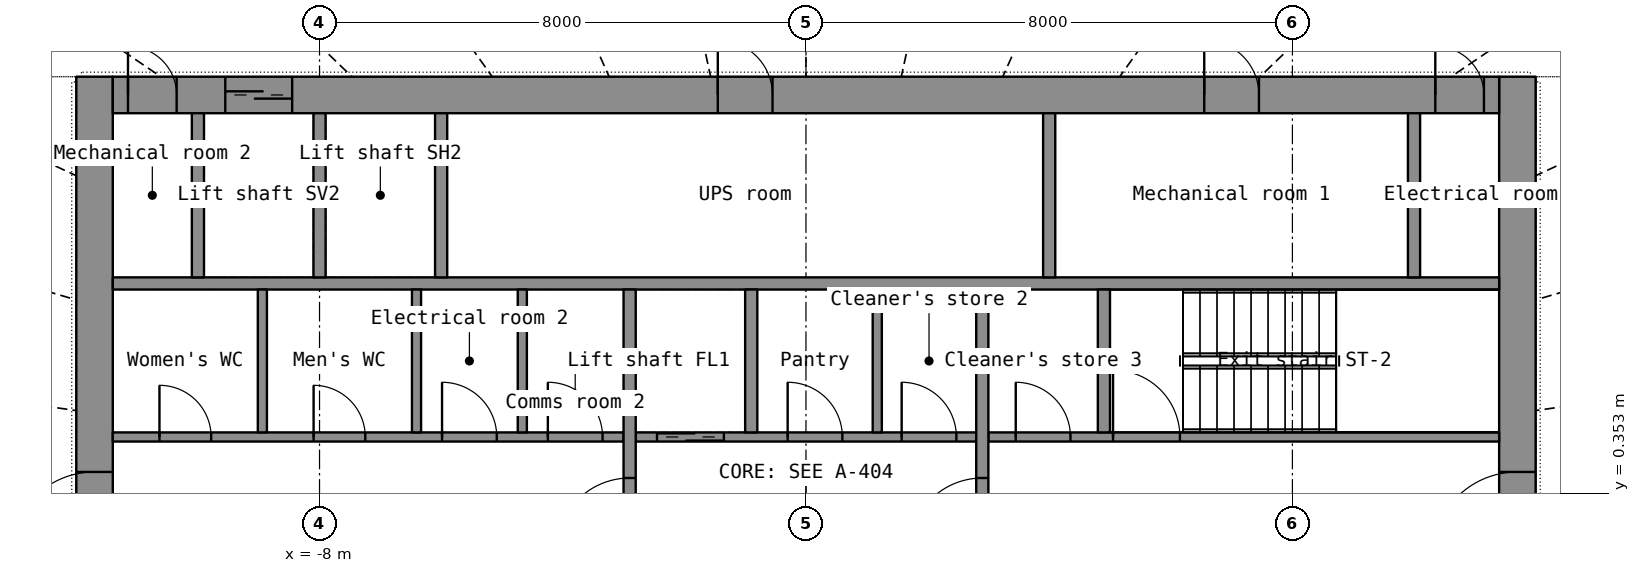
"""IFC4 building model, lengths in metres.
Left out: names, types, materials, properties, quantities, classifications, styles, units other than length and angle.
Written with IfcOpenShell. Run it as: python <this file> out.ifc"""

import sys

from ifc_helpers import new_model, si_unit, direction, frame, frame_2d, origin, place, context, subcontext, project, spatial, rectangle, extrude, element, fill, save


model = new_model("IFC4")
c1 = context("Model", 3, precision=1e-05, world=origin(), true_north=direction((0.0, 1.0)))
c2 = subcontext(c1, "Body", "Model", "MODEL_VIEW")
j1 = project(units=[si_unit("LENGTHUNIT", "METRE"), si_unit("PLANEANGLEUNIT", "RADIAN")], contexts=[c1])
p1 = place(None, origin())
s1 = spatial("IfcSite", under=j1, at=p1, CompositionType="ELEMENT")
p2 = place(p1, origin())
s2 = spatial("IfcBuilding", under=s1, at=p2, CompositionType="ELEMENT")
p3 = place(p2, frame((0.0, 0.0, 13.5)))
s3 = spatial("IfcBuildingStorey", under=s2, at=p3, CompositionType="ELEMENT", Elevation=13.5)
p4 = place(p3, frame((-11.7, -7.2, 0.0), z_axis=(0.0, 0.0, 1.0), x_axis=(0.0, 1.0, 0.0)))
e1 = element("IfcWall", 1, at=p4, inside=s3, PredefinedType="SHEAR", context=c2, shape_type="SweptSolid", body=[
    extrude(rectangle(XDim=14.4, YDim=0.6, at=frame_2d((7.2, 0.0))), origin(), (0.0, 0.0, 1.0), 6.1),
])
p5 = place(p4, frame((6.5, 0.0, 0.0)))
e2 = element("IfcOpeningElement", 2, at=p5, cuts=e1, PredefinedType="OPENING", context=c2, shape_type="SweptSolid", body=[
    extrude(rectangle(XDim=1.4, YDim=2.2, at=frame_2d((0.7, 1.1))), frame((0.0, 0.31, 0.0), z_axis=(0.0, -1.0, 0.0), x_axis=(1.0, 0.0, 0.0)), (0.0, 0.0, 1.0), 0.62),
])
p6 = place(p3, frame((11.7, -7.2, 0.0), z_axis=(0.0, 0.0, 1.0), x_axis=(0.0, 1.0, 0.0)))
e3 = element("IfcWall", 3, at=p6, inside=s3, PredefinedType="SHEAR", context=c2, shape_type="SweptSolid", body=[
    extrude(rectangle(XDim=14.4, YDim=0.6, at=frame_2d((7.2, 0.0))), origin(), (0.0, 0.0, 1.0), 6.1),
])
p7 = place(p6, frame((6.5, 0.0, 0.0)))
e4 = element("IfcOpeningElement", 4, at=p7, cuts=e3, PredefinedType="OPENING", context=c2, shape_type="SweptSolid", body=[
    extrude(rectangle(XDim=1.4, YDim=2.2, at=frame_2d((0.7, 1.1))), frame((0.0, 0.31, 0.0), z_axis=(0.0, -1.0, 0.0), x_axis=(1.0, 0.0, 0.0)), (0.0, 0.0, 1.0), 0.62),
])
p8 = place(p3, frame((-11.4, 6.9, 0.0), z_axis=(0.0, 0.0, 1.0), x_axis=(1.0, 0.0, 0.0)))
e5 = element("IfcWall", 5, at=p8, inside=s3, PredefinedType="SHEAR", context=c2, shape_type="SweptSolid", body=[
    extrude(rectangle(XDim=22.8, YDim=0.6, at=frame_2d((11.4, 0.0))), origin(), (0.0, 0.0, 1.0), 6.1),
])
p9 = place(p8, frame((1.85, 0.0, 0.0)))
e6 = element("IfcOpeningElement", 6, at=p9, cuts=e5, PredefinedType="OPENING", context=c2, shape_type="SweptSolid", body=[
    extrude(rectangle(XDim=1.1, YDim=2.2, at=frame_2d((0.55, 1.1))), frame((0.0, 0.31, 0.0), z_axis=(0.0, -1.0, 0.0), x_axis=(1.0, 0.0, 0.0)), (0.0, 0.0, 1.0), 0.62),
])
p10 = place(p8, frame((9.95, 0.0, 0.0)))
e7 = element("IfcOpeningElement", 7, at=p10, cuts=e5, PredefinedType="OPENING", context=c2, shape_type="SweptSolid", body=[
    extrude(rectangle(XDim=0.9, YDim=2.1, at=frame_2d((0.45, 1.05))), frame((0.0, 0.31, 0.0), z_axis=(0.0, -1.0, 0.0), x_axis=(1.0, 0.0, 0.0)), (0.0, 0.0, 1.0), 0.62),
])
p11 = place(p8, frame((17.95, 0.0, 0.0)))
e8 = element("IfcOpeningElement", 8, at=p11, cuts=e5, PredefinedType="OPENING", context=c2, shape_type="SweptSolid", body=[
    extrude(rectangle(XDim=0.9, YDim=2.1, at=frame_2d((0.45, 1.05))), frame((0.0, 0.31, 0.0), z_axis=(0.0, -1.0, 0.0), x_axis=(1.0, 0.0, 0.0)), (0.0, 0.0, 1.0), 0.62),
])
p12 = place(p8, frame((0.25, 0.0, 0.0)))
e9 = element("IfcOpeningElement", 9, at=p12, cuts=e5, PredefinedType="OPENING", context=c2, shape_type="SweptSolid", body=[
    extrude(rectangle(XDim=0.8, YDim=2.05, at=frame_2d((0.4, 1.025))), frame((0.0, 0.31, 0.0), z_axis=(0.0, -1.0, 0.0), x_axis=(1.0, 0.0, 0.0)), (0.0, 0.0, 1.0), 0.62),
])
p13 = place(p8, frame((21.75, 0.0, 0.0)))
e10 = element("IfcOpeningElement", 10, at=p13, cuts=e5, PredefinedType="OPENING", context=c2, shape_type="SweptSolid", body=[
    extrude(rectangle(XDim=0.8, YDim=2.05, at=frame_2d((0.4, 1.025))), frame((0.0, 0.31, 0.0), z_axis=(0.0, -1.0, 0.0), x_axis=(1.0, 0.0, 0.0)), (0.0, 0.0, 1.0), 0.62),
])
p14 = place(p3, frame((-11.4, 3.8, 0.0), z_axis=(0.0, 0.0, 1.0), x_axis=(1.0, 0.0, 0.0)))
e11 = element("IfcWall", 11, at=p14, inside=s3, PredefinedType="SHEAR", context=c2, shape_type="SweptSolid", body=[
    extrude(rectangle(XDim=22.8, YDim=0.2, at=frame_2d((11.4, 0.0))), origin(), (0.0, 0.0, 1.0), 6.1),
])
for number, where, z_axis, x_axis in (
    (12, (-10.0, 3.9, 0.0), (0.0, 0.0, 1.0), (0.0, 1.0, 0.0)),
    (13, (-8.0, 3.9, 0.0), (0.0, 0.0, 1.0), (0.0, 1.0, 0.0)),
    (14, (-6.0, 3.9, 0.0), (0.0, 0.0, 1.0), (0.0, 1.0, 0.0)),
    (15, (10.0, 3.9, 0.0), (0.0, 0.0, 1.0), (0.0, 1.0, 0.0)),
):
    element("IfcWall", number, at=place(p3, frame(where, z_axis=z_axis, x_axis=x_axis)), inside=s3, PredefinedType="SHEAR", context=c2, shape_type="SweptSolid", body=[
        extrude(rectangle(XDim=2.7, YDim=0.2, at=frame_2d((1.35, 0.0))), origin(), (0.0, 0.0, 1.0), 6.1),
    ])
p15 = place(p3, frame((4.0, 3.9, 0.0), z_axis=(0.0, 0.0, 1.0), x_axis=(0.0, 1.0, 0.0)))
e16 = element("IfcWall", 16, at=p15, inside=s3, PredefinedType="PARTITIONING", context=c2, shape_type="SweptSolid", body=[
    extrude(rectangle(XDim=2.7, YDim=0.2, at=frame_2d((1.35, 0.0))), origin(), (0.0, 0.0, 1.0), 6.1),
])
p16 = place(p3, frame((-11.4, 1.275, 0.0), z_axis=(0.0, 0.0, 1.0), x_axis=(1.0, 0.0, 0.0)))
e17 = element("IfcWall", 17, at=p16, inside=s3, PredefinedType="PARTITIONING", context=c2, shape_type="SweptSolid", body=[
    extrude(rectangle(XDim=8.4, YDim=0.15, at=frame_2d((4.2, 0.0))), origin(), (0.0, 0.0, 1.0), 6.1),
])
p17 = place(p16, frame((0.768, 0.0, 0.0)))
e18 = element("IfcOpeningElement", 18, at=p17, cuts=e17, PredefinedType="OPENING", context=c2, shape_type="SweptSolid", body=[
    extrude(rectangle(XDim=0.85, YDim=2.1, at=frame_2d((0.425, 1.05))), frame((0.0, 0.085, 0.0), z_axis=(0.0, -1.0, 0.0), x_axis=(1.0, 0.0, 0.0)), (0.0, 0.0, 1.0), 0.17),
])
p18 = place(p16, frame((3.302, 0.0, 0.0)))
e19 = element("IfcOpeningElement", 19, at=p18, cuts=e17, PredefinedType="OPENING", context=c2, shape_type="SweptSolid", body=[
    extrude(rectangle(XDim=0.85, YDim=2.1, at=frame_2d((0.425, 1.05))), frame((0.0, 0.085, 0.0), z_axis=(0.0, -1.0, 0.0), x_axis=(1.0, 0.0, 0.0)), (0.0, 0.0, 1.0), 0.17),
])
p19 = place(p16, frame((5.415, 0.0, 0.0)))
e20 = element("IfcOpeningElement", 20, at=p19, cuts=e17, PredefinedType="OPENING", context=c2, shape_type="SweptSolid", body=[
    extrude(rectangle(XDim=0.9, YDim=2.1, at=frame_2d((0.45, 1.05))), frame((0.0, 0.085, 0.0), z_axis=(0.0, -1.0, 0.0), x_axis=(1.0, 0.0, 0.0)), (0.0, 0.0, 1.0), 0.17),
])
p20 = place(p16, frame((7.155, 0.0, 0.0)))
e21 = element("IfcOpeningElement", 21, at=p20, cuts=e17, PredefinedType="OPENING", context=c2, shape_type="SweptSolid", body=[
    extrude(rectangle(XDim=0.9, YDim=2.1, at=frame_2d((0.45, 1.05))), frame((0.0, 0.085, 0.0), z_axis=(0.0, -1.0, 0.0), x_axis=(1.0, 0.0, 0.0)), (0.0, 0.0, 1.0), 0.17),
])
p21 = place(p3, frame((-2.8, 1.275, 0.0), z_axis=(0.0, 0.0, 1.0), x_axis=(1.0, 0.0, 0.0)))
e22 = element("IfcWall", 22, at=p21, inside=s3, PredefinedType="SHEAR", context=c2, shape_type="SweptSolid", body=[
    extrude(rectangle(XDim=5.6, YDim=0.15, at=frame_2d((2.8, 0.0))), origin(), (0.0, 0.0, 1.0), 6.1),
])
p22 = place(p21, frame((0.35, 0.0, 0.0)))
e23 = element("IfcOpeningElement", 23, at=p22, cuts=e22, PredefinedType="OPENING", context=c2, shape_type="SweptSolid", body=[
    extrude(rectangle(XDim=1.1, YDim=2.2, at=frame_2d((0.55, 1.1))), frame((0.0, 0.085, 0.0), z_axis=(0.0, -1.0, 0.0), x_axis=(1.0, 0.0, 0.0)), (0.0, 0.0, 1.0), 0.17),
])
p23 = place(p21, frame((2.499, 0.0, 0.0)))
e24 = element("IfcOpeningElement", 24, at=p23, cuts=e22, PredefinedType="OPENING", context=c2, shape_type="SweptSolid", body=[
    extrude(rectangle(XDim=0.9, YDim=2.1, at=frame_2d((0.45, 1.05))), frame((0.0, 0.085, 0.0), z_axis=(0.0, -1.0, 0.0), x_axis=(1.0, 0.0, 0.0)), (0.0, 0.0, 1.0), 0.17),
])
p24 = place(p21, frame((4.374, 0.0, 0.0)))
e25 = element("IfcOpeningElement", 25, at=p24, cuts=e22, PredefinedType="OPENING", context=c2, shape_type="SweptSolid", body=[
    extrude(rectangle(XDim=0.9, YDim=2.1, at=frame_2d((0.45, 1.05))), frame((0.0, 0.085, 0.0), z_axis=(0.0, -1.0, 0.0), x_axis=(1.0, 0.0, 0.0)), (0.0, 0.0, 1.0), 0.17),
])
p25 = place(p3, frame((3.0, 1.275, 0.0), z_axis=(0.0, 0.0, 1.0), x_axis=(1.0, 0.0, 0.0)))
e26 = element("IfcWall", 26, at=p25, inside=s3, PredefinedType="SHEAR", context=c2, shape_type="SweptSolid", body=[
    extrude(rectangle(XDim=8.4, YDim=0.15, at=frame_2d((4.2, 0.0))), origin(), (0.0, 0.0, 1.0), 6.1),
])
p26 = place(p25, frame((2.05, 0.0, 0.0)))
e27 = element("IfcOpeningElement", 27, at=p26, cuts=e26, PredefinedType="OPENING", context=c2, shape_type="SweptSolid", body=[
    extrude(rectangle(XDim=1.1, YDim=2.15, at=frame_2d((0.55, 1.075))), frame((0.0, 0.085, 0.0), z_axis=(0.0, -1.0, 0.0), x_axis=(1.0, 0.0, 0.0)), (0.0, 0.0, 1.0), 0.17),
])
p27 = place(p25, frame((0.45, 0.0, 0.0)))
e28 = element("IfcOpeningElement", 28, at=p27, cuts=e26, PredefinedType="OPENING", context=c2, shape_type="SweptSolid", body=[
    extrude(rectangle(XDim=0.9, YDim=2.1, at=frame_2d((0.45, 1.05))), frame((0.0, 0.085, 0.0), z_axis=(0.0, -1.0, 0.0), x_axis=(1.0, 0.0, 0.0)), (0.0, 0.0, 1.0), 0.17),
])
p28 = place(p3, frame((-2.9, -3.7, 0.0), z_axis=(0.0, 0.0, 1.0), x_axis=(0.0, 1.0, 0.0)))
e29 = element("IfcWall", 29, at=p28, inside=s3, PredefinedType="SHEAR", context=c2, shape_type="SweptSolid", body=[
    extrude(rectangle(XDim=7.4, YDim=0.2, at=frame_2d((3.7, 0.0))), origin(), (0.0, 0.0, 1.0), 6.1),
])
p29 = place(p28, frame((3.1, 0.0, 0.0)))
e30 = element("IfcOpeningElement", 30, at=p29, cuts=e29, PredefinedType="OPENING", context=c2, shape_type="SweptSolid", body=[
    extrude(rectangle(XDim=1.2, YDim=2.2, at=frame_2d((0.6, 1.1))), frame((0.0, 0.11, 0.0), z_axis=(0.0, -1.0, 0.0), x_axis=(1.0, 0.0, 0.0)), (0.0, 0.0, 1.0), 0.22),
])
p30 = place(p3, frame((2.9, -3.7, 0.0), z_axis=(0.0, 0.0, 1.0), x_axis=(0.0, 1.0, 0.0)))
e31 = element("IfcWall", 31, at=p30, inside=s3, PredefinedType="SHEAR", context=c2, shape_type="SweptSolid", body=[
    extrude(rectangle(XDim=7.4, YDim=0.2, at=frame_2d((3.7, 0.0))), origin(), (0.0, 0.0, 1.0), 6.1),
])
p31 = place(p30, frame((3.1, 0.0, 0.0)))
e32 = element("IfcOpeningElement", 32, at=p31, cuts=e31, PredefinedType="OPENING", context=c2, shape_type="SweptSolid", body=[
    extrude(rectangle(XDim=1.2, YDim=2.2, at=frame_2d((0.6, 1.1))), frame((0.0, 0.11, 0.0), z_axis=(0.0, -1.0, 0.0), x_axis=(1.0, 0.0, 0.0)), (0.0, 0.0, 1.0), 0.22),
])
for number, where, z_axis, x_axis in (
    (33, (-0.9, 1.35, 0.0), (0.0, 0.0, 1.0), (0.0, 1.0, 0.0)),
    (34, (4.9, 1.35, 0.0), (0.0, 0.0, 1.0), (0.0, 1.0, 0.0)),
):
    element("IfcWall", number, at=place(p3, frame(where, z_axis=z_axis, x_axis=x_axis)), inside=s3, PredefinedType="SHEAR", context=c2, shape_type="SweptSolid", body=[
        extrude(rectangle(XDim=2.35, YDim=0.2, at=frame_2d((1.175, 0.0))), origin(), (0.0, 0.0, 1.0), 6.1),
    ])
for number, where, z_axis, x_axis in (
    (35, (-8.94, 1.35, 0.0), (0.0, 0.0, 1.0), (0.0, 1.0, 0.0)),
    (36, (-6.405, 1.35, 0.0), (0.0, 0.0, 1.0), (0.0, 1.0, 0.0)),
    (37, (-4.665, 1.35, 0.0), (0.0, 0.0, 1.0), (0.0, 1.0, 0.0)),
    (38, (1.173, 1.35, 0.0), (0.0, 0.0, 1.0), (0.0, 1.0, 0.0)),
):
    element("IfcWall", number, at=place(p3, frame(where, z_axis=z_axis, x_axis=x_axis)), inside=s3, PredefinedType="PARTITIONING", context=c2, shape_type="SweptSolid", body=[
        extrude(rectangle(XDim=2.35, YDim=0.15, at=frame_2d((1.175, 0.0))), origin(), (0.0, 0.0, 1.0), 6.1),
    ])
p32 = place(p9, origin())
e39 = element("IfcDoor", 39, at=p32, inside=s3, OperationType="DOUBLE_DOOR_SLIDING", PredefinedType="DOOR", context=c2, shape_type="SweptSolid", body=[
    extrude(rectangle(XDim=1.1, YDim=2.2, at=frame_2d((0.55, 1.1))), frame((0.0, 0.025, 0.0), z_axis=(0.0, -1.0, 0.0), x_axis=(1.0, 0.0, 0.0)), (0.0, 0.0, 1.0), 0.05),
])
fill(e6, e39)
p33 = place(p10, origin())
e40 = element("IfcDoor", 40, at=p33, inside=s3, OperationType="SINGLE_SWING_LEFT", PredefinedType="DOOR", context=c2, shape_type="SweptSolid", body=[
    extrude(rectangle(XDim=0.9, YDim=2.1, at=frame_2d((0.45, 1.05))), frame((0.0, 0.025, 0.0), z_axis=(0.0, -1.0, 0.0), x_axis=(1.0, 0.0, 0.0)), (0.0, 0.0, 1.0), 0.05),
])
fill(e7, e40)
p34 = place(p11, origin())
e41 = element("IfcDoor", 41, at=p34, inside=s3, OperationType="SINGLE_SWING_LEFT", PredefinedType="DOOR", context=c2, shape_type="SweptSolid", body=[
    extrude(rectangle(XDim=0.9, YDim=2.1, at=frame_2d((0.45, 1.05))), frame((0.0, 0.025, 0.0), z_axis=(0.0, -1.0, 0.0), x_axis=(1.0, 0.0, 0.0)), (0.0, 0.0, 1.0), 0.05),
])
fill(e8, e41)
p35 = place(p12, origin())
e42 = element("IfcDoor", 42, at=p35, inside=s3, OperationType="SINGLE_SWING_LEFT", PredefinedType="DOOR", context=c2, shape_type="SweptSolid", body=[
    extrude(rectangle(XDim=0.8, YDim=2.05, at=frame_2d((0.4, 1.025))), frame((0.0, 0.025, 0.0), z_axis=(0.0, -1.0, 0.0), x_axis=(1.0, 0.0, 0.0)), (0.0, 0.0, 1.0), 0.05),
])
fill(e9, e42)
p36 = place(p13, origin())
e43 = element("IfcDoor", 43, at=p36, inside=s3, OperationType="SINGLE_SWING_LEFT", PredefinedType="DOOR", context=c2, shape_type="SweptSolid", body=[
    extrude(rectangle(XDim=0.8, YDim=2.05, at=frame_2d((0.4, 1.025))), frame((0.0, 0.025, 0.0), z_axis=(0.0, -1.0, 0.0), x_axis=(1.0, 0.0, 0.0)), (0.0, 0.0, 1.0), 0.05),
])
fill(e10, e43)
p37 = place(p5, origin())
e44 = element("IfcDoor", 44, at=p37, inside=s3, OperationType="DOUBLE_DOOR_SINGLE_SWING", PredefinedType="DOOR", context=c2, shape_type="SweptSolid", body=[
    extrude(rectangle(XDim=1.4, YDim=2.2, at=frame_2d((0.7, 1.1))), frame((0.0, 0.025, 0.0), z_axis=(0.0, -1.0, 0.0), x_axis=(1.0, 0.0, 0.0)), (0.0, 0.0, 1.0), 0.05),
])
fill(e2, e44)
p38 = place(p7, origin())
e45 = element("IfcDoor", 45, at=p38, inside=s3, OperationType="DOUBLE_DOOR_SINGLE_SWING", PredefinedType="DOOR", context=c2, shape_type="SweptSolid", body=[
    extrude(rectangle(XDim=1.4, YDim=2.2, at=frame_2d((0.7, 1.1))), frame((0.0, 0.025, 0.0), z_axis=(0.0, -1.0, 0.0), x_axis=(1.0, 0.0, 0.0)), (0.0, 0.0, 1.0), 0.05),
])
fill(e4, e45)
p39 = place(p29, origin())
e46 = element("IfcDoor", 46, at=p39, inside=s3, OperationType="SINGLE_SWING_LEFT", PredefinedType="DOOR", context=c2, shape_type="SweptSolid", body=[
    extrude(rectangle(XDim=1.2, YDim=2.2, at=frame_2d((0.6, 1.1))), frame((0.0, 0.025, 0.0), z_axis=(0.0, -1.0, 0.0), x_axis=(1.0, 0.0, 0.0)), (0.0, 0.0, 1.0), 0.05),
])
fill(e30, e46)
p40 = place(p31, origin())
e47 = element("IfcDoor", 47, at=p40, inside=s3, OperationType="SINGLE_SWING_LEFT", PredefinedType="DOOR", context=c2, shape_type="SweptSolid", body=[
    extrude(rectangle(XDim=1.2, YDim=2.2, at=frame_2d((0.6, 1.1))), frame((0.0, 0.025, 0.0), z_axis=(0.0, -1.0, 0.0), x_axis=(1.0, 0.0, 0.0)), (0.0, 0.0, 1.0), 0.05),
])
fill(e32, e47)
p41 = place(p22, origin())
e48 = element("IfcDoor", 48, at=p41, inside=s3, OperationType="DOUBLE_DOOR_SLIDING", PredefinedType="DOOR", context=c2, shape_type="SweptSolid", body=[
    extrude(rectangle(XDim=1.1, YDim=2.2, at=frame_2d((0.55, 1.1))), frame((0.0, 0.025, 0.0), z_axis=(0.0, -1.0, 0.0), x_axis=(1.0, 0.0, 0.0)), (0.0, 0.0, 1.0), 0.05),
])
fill(e23, e48)
p42 = place(p26, origin())
e49 = element("IfcDoor", 49, at=p42, inside=s3, OperationType="SINGLE_SWING_LEFT", PredefinedType="DOOR", context=c2, shape_type="SweptSolid", body=[
    extrude(rectangle(XDim=1.1, YDim=2.15, at=frame_2d((0.55, 1.075))), frame((0.0, 0.025, 0.0), z_axis=(0.0, -1.0, 0.0), x_axis=(1.0, 0.0, 0.0)), (0.0, 0.0, 1.0), 0.05),
])
fill(e27, e49)
p43 = place(p17, origin())
e50 = element("IfcDoor", 50, at=p43, inside=s3, OperationType="SINGLE_SWING_LEFT", PredefinedType="DOOR", context=c2, shape_type="SweptSolid", body=[
    extrude(rectangle(XDim=0.85, YDim=2.1, at=frame_2d((0.425, 1.05))), frame((0.0, 0.025, 0.0), z_axis=(0.0, -1.0, 0.0), x_axis=(1.0, 0.0, 0.0)), (0.0, 0.0, 1.0), 0.05),
])
fill(e18, e50)
p44 = place(p18, origin())
e51 = element("IfcDoor", 51, at=p44, inside=s3, OperationType="SINGLE_SWING_LEFT", PredefinedType="DOOR", context=c2, shape_type="SweptSolid", body=[
    extrude(rectangle(XDim=0.85, YDim=2.1, at=frame_2d((0.425, 1.05))), frame((0.0, 0.025, 0.0), z_axis=(0.0, -1.0, 0.0), x_axis=(1.0, 0.0, 0.0)), (0.0, 0.0, 1.0), 0.05),
])
fill(e19, e51)
p45 = place(p19, origin())
e52 = element("IfcDoor", 52, at=p45, inside=s3, OperationType="SINGLE_SWING_LEFT", PredefinedType="DOOR", context=c2, shape_type="SweptSolid", body=[
    extrude(rectangle(XDim=0.9, YDim=2.1, at=frame_2d((0.45, 1.05))), frame((0.0, 0.025, 0.0), z_axis=(0.0, -1.0, 0.0), x_axis=(1.0, 0.0, 0.0)), (0.0, 0.0, 1.0), 0.05),
])
fill(e20, e52)
p46 = place(p20, origin())
e53 = element("IfcDoor", 53, at=p46, inside=s3, OperationType="SINGLE_SWING_LEFT", PredefinedType="DOOR", context=c2, shape_type="SweptSolid", body=[
    extrude(rectangle(XDim=0.9, YDim=2.1, at=frame_2d((0.45, 1.05))), frame((0.0, 0.025, 0.0), z_axis=(0.0, -1.0, 0.0), x_axis=(1.0, 0.0, 0.0)), (0.0, 0.0, 1.0), 0.05),
])
fill(e21, e53)
p47 = place(p23, origin())
e54 = element("IfcDoor", 54, at=p47, inside=s3, OperationType="SINGLE_SWING_LEFT", PredefinedType="DOOR", context=c2, shape_type="SweptSolid", body=[
    extrude(rectangle(XDim=0.9, YDim=2.1, at=frame_2d((0.45, 1.05))), frame((0.0, 0.025, 0.0), z_axis=(0.0, -1.0, 0.0), x_axis=(1.0, 0.0, 0.0)), (0.0, 0.0, 1.0), 0.05),
])
fill(e24, e54)
p48 = place(p24, origin())
e55 = element("IfcDoor", 55, at=p48, inside=s3, OperationType="SINGLE_SWING_LEFT", PredefinedType="DOOR", context=c2, shape_type="SweptSolid", body=[
    extrude(rectangle(XDim=0.9, YDim=2.1, at=frame_2d((0.45, 1.05))), frame((0.0, 0.025, 0.0), z_axis=(0.0, -1.0, 0.0), x_axis=(1.0, 0.0, 0.0)), (0.0, 0.0, 1.0), 0.05),
])
fill(e25, e55)
p49 = place(p27, origin())
e56 = element("IfcDoor", 56, at=p49, inside=s3, OperationType="SINGLE_SWING_LEFT", PredefinedType="DOOR", context=c2, shape_type="SweptSolid", body=[
    extrude(rectangle(XDim=0.9, YDim=2.1, at=frame_2d((0.45, 1.05))), frame((0.0, 0.025, 0.0), z_axis=(0.0, -1.0, 0.0), x_axis=(1.0, 0.0, 0.0)), (0.0, 0.0, 1.0), 0.05),
])
fill(e28, e56)
save(model, sys.argv[1])
